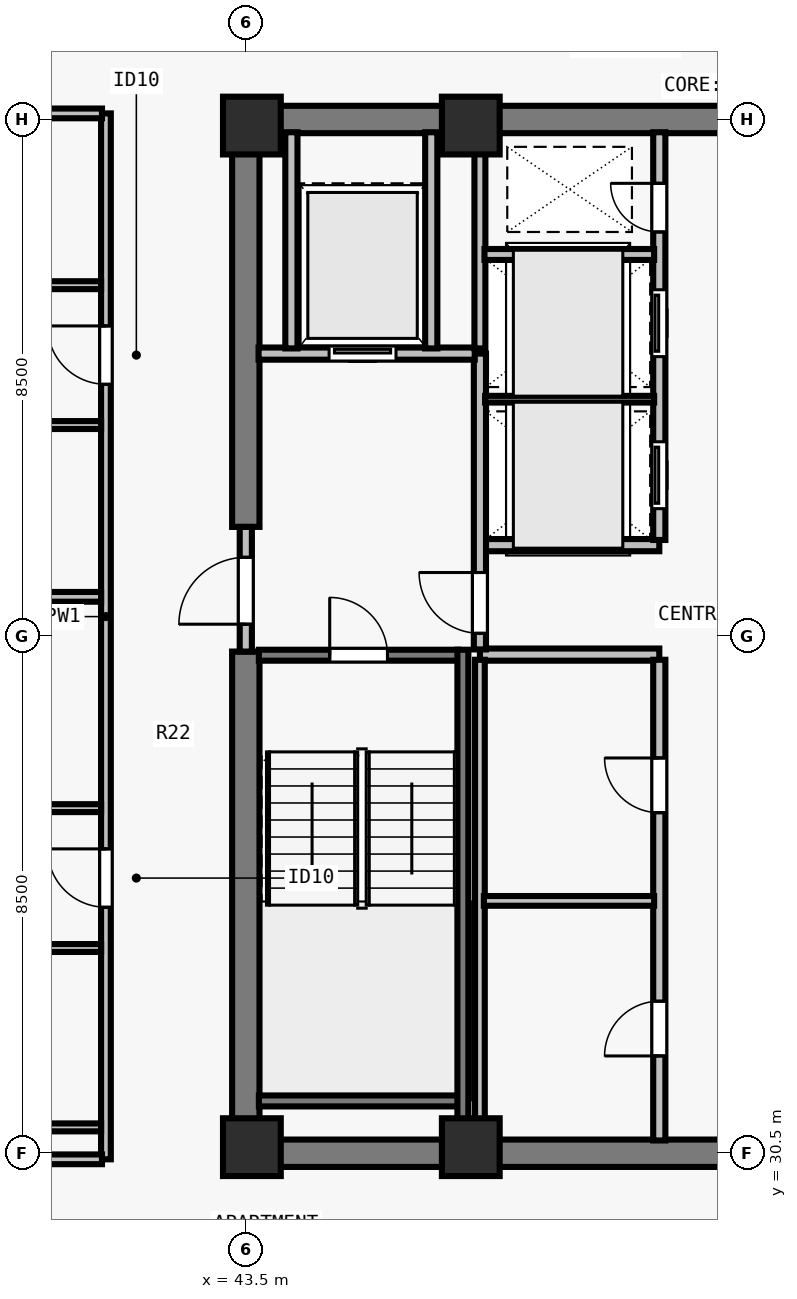
"""IFC4 building model, lengths in metres.
Left out: names, types, materials, properties, quantities, classifications, styles, units other than length and angle.
Written with IfcOpenShell. Run it as: python <this file> out.ifc"""

import sys

from ifc_helpers import new_model, si_unit, direction, frame, frame_2d, origin, origin_2d, place, context, subcontext, project, spatial, rectangle, extrude, element, fill, save


model = new_model("IFC4")
c1 = context("Model", 3, precision=1e-05, world=origin(), true_north=direction((0.0, 1.0)))
c2 = subcontext(c1, "Body", "Model", "MODEL_VIEW")
j1 = project(units=[si_unit("LENGTHUNIT", "METRE"), si_unit("PLANEANGLEUNIT", "RADIAN")], contexts=[c1])
p1 = place(None, origin())
s1 = spatial("IfcSite", under=j1, at=p1, CompositionType="ELEMENT")
p2 = place(p1, origin())
s2 = spatial("IfcBuilding", under=s1, at=p2, CompositionType="ELEMENT")
p3 = place(p2, frame((0.0, 0.0, 234.0)))
s3 = spatial("IfcBuildingStorey", under=s2, at=p3, CompositionType="ELEMENT", Elevation=234.0)
for number, where, z_axis, x_axis in (
    (1, (43.6, 30.6, 0.0), (0.0, 0.0, 1.0), (1.0, 0.0, 0.0)),
    (2, (47.2, 30.6, 0.0), (0.0, 0.0, 1.0), (1.0, 0.0, 0.0)),
    (3, (43.6, 47.4, 0.0), (0.0, 0.0, 1.0), (1.0, 0.0, 0.0)),
    (4, (47.2, 47.4, 0.0), (0.0, 0.0, 1.0), (1.0, 0.0, 0.0)),
):
    element("IfcColumn", number, at=place(p3, frame(where, z_axis=z_axis, x_axis=x_axis)), inside=s3, PredefinedType="COLUMN", context=c2, shape_type="SweptSolid", body=[
        extrude(rectangle(XDim=0.95, YDim=0.95, at=origin_2d()), origin(), (0.0, 0.0, 1.0), 3.5),
    ])
for number, where, z_axis, x_axis in (
    (5, (43.275, 30.5, 0.0), (0.0, 0.0, 1.0), (1.0, 0.0, 0.0)),
    (6, (43.275, 47.5, 0.0), (0.0, 0.0, 1.0), (1.0, 0.0, 0.0)),
):
    element("IfcWall", number, at=place(p3, frame(where, z_axis=z_axis, x_axis=x_axis)), inside=s3, PredefinedType="SHEAR", context=c2, shape_type="SweptSolid", body=[
        extrude(rectangle(XDim=17.45, YDim=0.45, at=frame_2d((8.725, 0.0))), origin(), (0.0, 0.0, 1.0), 3.29),
    ])
p4 = place(p3, frame((43.5, 30.715, 0.0), z_axis=(0.0, 0.0, 1.0), x_axis=(0.0, 1.0, 0.0)))
e7 = element("IfcWall", 7, at=p4, inside=s3, PredefinedType="SHEAR", context=c2, shape_type="SweptSolid", body=[
    extrude(rectangle(XDim=8.035, YDim=0.45, at=frame_2d((4.018, 0.0))), origin(), (0.0, 0.0, 1.0), 3.29),
])
p5 = place(p3, frame((43.5, 40.8, 0.0), z_axis=(0.0, 0.0, 1.0), x_axis=(0.0, 1.0, 0.0)))
e8 = element("IfcWall", 8, at=p5, inside=s3, PredefinedType="SHEAR", context=c2, shape_type="SweptSolid", body=[
    extrude(rectangle(XDim=6.485, YDim=0.45, at=frame_2d((3.242, 0.0))), origin(), (0.0, 0.0, 1.0), 3.29),
])
for number, where, z_axis, x_axis in (
    (9, (47.35, 38.7, 0.0), (0.0, 0.0, 1.0), (1.0, 0.0, 0.0)),
    (10, (47.35, 40.5, 0.0), (0.0, 0.0, 1.0), (1.0, 0.0, 0.0)),
):
    element("IfcWall", number, at=place(p3, frame(where, z_axis=z_axis, x_axis=x_axis)), inside=s3, PredefinedType="SOLIDWALL", context=c2, shape_type="SweptSolid", body=[
        extrude(rectangle(XDim=2.95, YDim=0.2, at=frame_2d((1.475, 0.0))), origin(), (0.0, 0.0, 1.0), 3.29),
    ])
p6 = place(p3, frame((50.3, 30.71, 0.0), z_axis=(0.0, 0.0, 1.0), x_axis=(0.0, 1.0, 0.0)))
e11 = element("IfcWall", 11, at=p6, inside=s3, PredefinedType="SOLIDWALL", context=c2, shape_type="SweptSolid", body=[
    extrude(rectangle(XDim=7.905, YDim=0.2, at=frame_2d((3.953, 0.0))), origin(), (0.0, 0.0, 1.0), 3.29),
])
p7 = place(p6, frame((1.39, 0.0, 0.0)))
e12 = element("IfcOpeningElement", 12, at=p7, cuts=e11, PredefinedType="OPENING", context=c2, shape_type="SweptSolid", body=[
    extrude(rectangle(XDim=0.9, YDim=2.12, at=frame_2d((0.45, 1.06))), frame((0.0, 0.11, 0.0), z_axis=(0.0, -1.0, 0.0), x_axis=(1.0, 0.0, 0.0)), (0.0, 0.0, 1.0), 0.22),
])
p8 = place(p6, frame((5.39, 0.0, 0.0)))
e13 = element("IfcOpeningElement", 13, at=p8, cuts=e11, PredefinedType="OPENING", context=c2, shape_type="SweptSolid", body=[
    extrude(rectangle(XDim=0.9, YDim=2.12, at=frame_2d((0.45, 1.06))), frame((0.0, 0.11, 0.0), z_axis=(0.0, -1.0, 0.0), x_axis=(1.0, 0.0, 0.0)), (0.0, 0.0, 1.0), 0.22),
])
p9 = place(p3, frame((50.3, 40.585, 0.0), z_axis=(0.0, 0.0, 1.0), x_axis=(0.0, 1.0, 0.0)))
e14 = element("IfcWall", 14, at=p9, inside=s3, PredefinedType="SOLIDWALL", context=c2, shape_type="SweptSolid", body=[
    extrude(rectangle(XDim=6.705, YDim=0.2, at=frame_2d((3.353, 0.0))), origin(), (0.0, 0.0, 1.0), 3.29),
])
p10 = place(p9, frame((0.515, 0.0, 0.0)))
e15 = element("IfcOpeningElement", 15, at=p10, cuts=e14, PredefinedType="OPENING", context=c2, shape_type="SweptSolid", body=[
    extrude(rectangle(XDim=1.1, YDim=2.2, at=frame_2d((0.55, 1.1))), frame((0.0, 0.11, 0.0), z_axis=(0.0, -1.0, 0.0), x_axis=(1.0, 0.0, 0.0)), (0.0, 0.0, 1.0), 0.22),
])
p11 = place(p9, frame((3.015, 0.0, 0.0)))
e16 = element("IfcOpeningElement", 16, at=p11, cuts=e14, PredefinedType="OPENING", context=c2, shape_type="SweptSolid", body=[
    extrude(rectangle(XDim=1.1, YDim=2.2, at=frame_2d((0.55, 1.1))), frame((0.0, 0.11, 0.0), z_axis=(0.0, -1.0, 0.0), x_axis=(1.0, 0.0, 0.0)), (0.0, 0.0, 1.0), 0.22),
])
p12 = place(p9, frame((5.065, 0.0, 0.0)))
e17 = element("IfcOpeningElement", 17, at=p12, cuts=e14, PredefinedType="OPENING", context=c2, shape_type="SweptSolid", body=[
    extrude(rectangle(XDim=0.8, YDim=2.08, at=frame_2d((0.4, 1.04))), frame((0.0, 0.11, 0.0), z_axis=(0.0, -1.0, 0.0), x_axis=(1.0, 0.0, 0.0)), (0.0, 0.0, 1.0), 0.22),
])
p13 = place(p3, frame((43.5, 38.75, 0.0), z_axis=(0.0, 0.0, 1.0), x_axis=(0.0, 1.0, 0.0)))
e18 = element("IfcWall", 18, at=p13, inside=s3, PredefinedType="SOLIDWALL", context=c2, shape_type="SweptSolid", body=[
    extrude(rectangle(XDim=2.05, YDim=0.2, at=frame_2d((1.025, 0.0))), origin(), (0.0, 0.0, 1.0), 3.29),
])
p14 = place(p13, frame((0.45, 0.0, 0.0)))
e19 = element("IfcOpeningElement", 19, at=p14, cuts=e18, PredefinedType="OPENING", context=c2, shape_type="SweptSolid", body=[
    extrude(rectangle(XDim=1.1, YDim=2.15, at=frame_2d((0.55, 1.075))), frame((0.0, 0.11, 0.0), z_axis=(0.0, -1.0, 0.0), x_axis=(1.0, 0.0, 0.0)), (0.0, 0.0, 1.0), 0.22),
])
p15 = place(p3, frame((47.35, 38.785, 0.0), z_axis=(0.0, 0.0, 1.0), x_axis=(0.0, 1.0, 0.0)))
e20 = element("IfcWall", 20, at=p15, inside=s3, PredefinedType="SOLIDWALL", context=c2, shape_type="SweptSolid", body=[
    extrude(rectangle(XDim=4.865, YDim=0.2, at=frame_2d((2.433, 0.0))), origin(), (0.0, 0.0, 1.0), 3.29),
])
p16 = place(p15, frame((0.265, 0.0, 0.0)))
e21 = element("IfcOpeningElement", 21, at=p16, cuts=e20, PredefinedType="OPENING", context=c2, shape_type="SweptSolid", body=[
    extrude(rectangle(XDim=1.0, YDim=2.15, at=frame_2d((0.5, 1.075))), frame((0.0, 0.11, 0.0), z_axis=(0.0, -1.0, 0.0), x_axis=(1.0, 0.0, 0.0)), (0.0, 0.0, 1.0), 0.22),
])
p17 = place(p3, frame((43.71, 43.65, 0.0), z_axis=(0.0, 0.0, 1.0), x_axis=(1.0, 0.0, 0.0)))
e22 = element("IfcWall", 22, at=p17, inside=s3, PredefinedType="SOLIDWALL", context=c2, shape_type="SweptSolid", body=[
    extrude(rectangle(XDim=3.555, YDim=0.2, at=frame_2d((1.777, 0.0))), origin(), (0.0, 0.0, 1.0), 3.29),
])
p18 = place(p17, frame((1.16, 0.0, 0.0)))
e23 = element("IfcOpeningElement", 23, at=p18, cuts=e22, PredefinedType="OPENING", context=c2, shape_type="SweptSolid", body=[
    extrude(rectangle(XDim=1.1, YDim=2.2, at=frame_2d((0.55, 1.1))), frame((0.0, 0.11, 0.0), z_axis=(0.0, -1.0, 0.0), x_axis=(1.0, 0.0, 0.0)), (0.0, 0.0, 1.0), 0.22),
])
for number, where, z_axis, x_axis in (
    (24, (46.55, 43.735, 0.0), (0.0, 0.0, 1.0), (0.0, 1.0, 0.0)),
    (25, (44.25, 43.735, 0.0), (0.0, 0.0, 1.0), (0.0, 1.0, 0.0)),
):
    element("IfcWall", number, at=place(p3, frame(where, z_axis=z_axis, x_axis=x_axis)), inside=s3, PredefinedType="SOLIDWALL", context=c2, shape_type="SweptSolid", body=[
        extrude(rectangle(XDim=3.555, YDim=0.2, at=frame_2d((1.777, 0.0))), origin(), (0.0, 0.0, 1.0), 3.29),
    ])
p19 = place(p3, frame((47.35, 30.71, 0.0), z_axis=(0.0, 0.0, 1.0), x_axis=(0.0, 1.0, 0.0)))
e26 = element("IfcWall", 26, at=p19, inside=s3, PredefinedType="PARTITIONING", context=c2, shape_type="SweptSolid", body=[
    extrude(rectangle(XDim=7.905, YDim=0.16, at=frame_2d((3.953, 0.0))), origin(), (0.0, 0.0, 1.0), 3.29),
])
p20 = place(p3, frame((47.415, 34.65, 0.0), z_axis=(0.0, 0.0, 1.0), x_axis=(1.0, 0.0, 0.0)))
e27 = element("IfcWall", 27, at=p20, inside=s3, PredefinedType="PARTITIONING", context=c2, shape_type="SweptSolid", body=[
    extrude(rectangle(XDim=2.8, YDim=0.16, at=frame_2d((1.4, 0.0))), origin(), (0.0, 0.0, 1.0), 3.29),
])
p21 = place(p3, frame((47.35, 43.735, 0.0), z_axis=(0.0, 0.0, 1.0), x_axis=(0.0, 1.0, 0.0)))
e28 = element("IfcWall", 28, at=p21, inside=s3, PredefinedType="SOLIDWALL", context=c2, shape_type="SweptSolid", body=[
    extrude(rectangle(XDim=3.555, YDim=0.18, at=frame_2d((1.777, 0.0))), origin(), (0.0, 0.0, 1.0), 3.29),
])
p22 = place(p3, frame((47.435, 42.9, 0.0), z_axis=(0.0, 0.0, 1.0), x_axis=(1.0, 0.0, 0.0)))
e29 = element("IfcWall", 29, at=p22, inside=s3, PredefinedType="PARTITIONING", context=c2, shape_type="SweptSolid", body=[
    extrude(rectangle(XDim=2.78, YDim=0.11, at=frame_2d((1.39, 0.0))), origin(), (0.0, 0.0, 1.0), 3.29),
])
p23 = place(p3, frame((47.425, 45.28, 0.0), z_axis=(0.0, 0.0, 1.0), x_axis=(1.0, 0.0, 0.0)))
e30 = element("IfcWall", 30, at=p23, inside=s3, PredefinedType="SOLIDWALL", context=c2, shape_type="SweptSolid", body=[
    extrude(rectangle(XDim=2.79, YDim=0.18, at=frame_2d((1.395, 0.0))), origin(), (0.0, 0.0, 1.0), 3.29),
])
p24 = place(p3, frame((41.2, 30.4, 0.0), z_axis=(0.0, 0.0, 1.0), x_axis=(0.0, 1.0, 0.0)))
e31 = element("IfcWall", 31, at=p24, inside=s3, PredefinedType="PARTITIONING", context=c2, shape_type="SweptSolid", body=[
    extrude(rectangle(XDim=17.2, YDim=0.16, at=frame_2d((8.6, 0.0))), origin(), (0.0, 0.0, 1.0), 3.29),
])
p25 = place(p24, frame((4.145, 0.0, 0.0)))
e32 = element("IfcOpeningElement", 32, at=p25, cuts=e31, PredefinedType="OPENING", context=c2, shape_type="SweptSolid", body=[
    extrude(rectangle(XDim=0.96, YDim=2.18, at=frame_2d((0.48, 1.09))), frame((0.0, 0.09, 0.0), z_axis=(0.0, -1.0, 0.0), x_axis=(1.0, 0.0, 0.0)), (0.0, 0.0, 1.0), 0.18),
])
p26 = place(p24, frame((12.745, 0.0, 0.0)))
e33 = element("IfcOpeningElement", 33, at=p26, cuts=e31, PredefinedType="OPENING", context=c2, shape_type="SweptSolid", body=[
    extrude(rectangle(XDim=0.96, YDim=2.18, at=frame_2d((0.48, 1.09))), frame((0.0, 0.09, 0.0), z_axis=(0.0, -1.0, 0.0), x_axis=(1.0, 0.0, 0.0)), (0.0, 0.0, 1.0), 0.18),
])
p27 = place(p3, frame((29.805, 30.4, 0.0), z_axis=(0.0, 0.0, 1.0), x_axis=(1.0, 0.0, 0.0)))
e34 = element("IfcWall", 34, at=p27, inside=s3, PredefinedType="PARTITIONING", context=c2, shape_type="SweptSolid", body=[
    extrude(rectangle(XDim=11.33, YDim=0.16, at=frame_2d((5.665, 0.0))), origin(), (0.0, 0.0, 1.0), 3.29),
])
p28 = place(p3, frame((29.915, 47.6, 0.0), z_axis=(0.0, 0.0, 1.0), x_axis=(1.0, 0.0, 0.0)))
e35 = element("IfcWall", 35, at=p28, inside=s3, PredefinedType="PARTITIONING", context=c2, shape_type="SweptSolid", body=[
    extrude(rectangle(XDim=11.22, YDim=0.16, at=frame_2d((5.61, 0.0))), origin(), (0.0, 0.0, 1.0), 3.29),
])
p29 = place(p3, frame((29.805, 39.65, 0.0), z_axis=(0.0, 0.0, 1.0), x_axis=(1.0, 0.0, 0.0)))
e36 = element("IfcWall", 36, at=p29, inside=s3, PredefinedType="PARTITIONING", context=c2, shape_type="SweptSolid", body=[
    extrude(rectangle(XDim=11.315, YDim=0.16, at=frame_2d((5.658, 0.0))), origin(), (0.0, 0.0, 1.0), 2.958),
])
p30 = place(p3, frame((38.37, 30.925, 0.0), z_axis=(0.0, 0.0, 1.0), x_axis=(1.0, 0.0, 0.0)))
e37 = element("IfcWall", 37, at=p30, inside=s3, PredefinedType="PLUMBINGWALL", context=c2, shape_type="SweptSolid", body=[
    extrude(rectangle(XDim=2.75, YDim=0.13, at=frame_2d((1.375, 0.0))), origin(), (0.0, 0.0, 1.0), 3.29),
])
p31 = place(p3, frame((38.37, 33.875, 0.0), z_axis=(0.0, 0.0, 1.0), x_axis=(1.0, 0.0, 0.0)))
e38 = element("IfcWall", 38, at=p31, inside=s3, PredefinedType="PLUMBINGWALL", context=c2, shape_type="SweptSolid", body=[
    extrude(rectangle(XDim=2.75, YDim=0.13, at=frame_2d((1.375, 0.0))), origin(), (0.0, 0.0, 1.0), 3.29),
])
p32 = place(p31, frame((0.55, 0.0, 0.0)))
e39 = element("IfcOpeningElement", 39, at=p32, cuts=e38, PredefinedType="OPENING", context=c2, shape_type="SweptSolid", body=[
    extrude(rectangle(XDim=0.85, YDim=2.08, at=frame_2d((0.425, 1.04))), frame((0.0, 0.075, 0.0), z_axis=(0.0, -1.0, 0.0), x_axis=(1.0, 0.0, 0.0)), (0.0, 0.0, 1.0), 0.15),
])
p33 = place(p3, frame((38.37, 36.175, 0.0), z_axis=(0.0, 0.0, 1.0), x_axis=(1.0, 0.0, 0.0)))
e40 = element("IfcWall", 40, at=p33, inside=s3, PredefinedType="PLUMBINGWALL", context=c2, shape_type="SweptSolid", body=[
    extrude(rectangle(XDim=2.75, YDim=0.13, at=frame_2d((1.375, 0.0))), origin(), (0.0, 0.0, 1.0), 3.29),
])
p34 = place(p33, frame((0.55, 0.0, 0.0)))
e41 = element("IfcOpeningElement", 41, at=p34, cuts=e40, PredefinedType="OPENING", context=c2, shape_type="SweptSolid", body=[
    extrude(rectangle(XDim=0.88, YDim=2.1, at=frame_2d((0.44, 1.05))), frame((0.0, 0.075, 0.0), z_axis=(0.0, -1.0, 0.0), x_axis=(1.0, 0.0, 0.0)), (0.0, 0.0, 1.0), 0.15),
])
p35 = place(p3, frame((38.37, 42.475, 0.0), z_axis=(0.0, 0.0, 1.0), x_axis=(1.0, 0.0, 0.0)))
e42 = element("IfcWall", 42, at=p35, inside=s3, PredefinedType="PLUMBINGWALL", context=c2, shape_type="SweptSolid", body=[
    extrude(rectangle(XDim=2.75, YDim=0.13, at=frame_2d((1.375, 0.0))), origin(), (0.0, 0.0, 1.0), 2.958),
])
p36 = place(p35, frame((0.55, 0.0, 0.0)))
e43 = element("IfcOpeningElement", 43, at=p36, cuts=e42, PredefinedType="OPENING", context=c2, shape_type="SweptSolid", body=[
    extrude(rectangle(XDim=0.85, YDim=2.08, at=frame_2d((0.425, 1.04))), frame((0.0, 0.075, 0.0), z_axis=(0.0, -1.0, 0.0), x_axis=(1.0, 0.0, 0.0)), (0.0, 0.0, 1.0), 0.15),
])
p37 = place(p3, frame((38.37, 44.775, 0.0), z_axis=(0.0, 0.0, 1.0), x_axis=(1.0, 0.0, 0.0)))
e44 = element("IfcWall", 44, at=p37, inside=s3, PredefinedType="PLUMBINGWALL", context=c2, shape_type="SweptSolid", body=[
    extrude(rectangle(XDim=2.75, YDim=0.13, at=frame_2d((1.375, 0.0))), origin(), (0.0, 0.0, 1.0), 2.958),
])
p38 = place(p37, frame((0.55, 0.0, 0.0)))
e45 = element("IfcOpeningElement", 45, at=p38, cuts=e44, PredefinedType="OPENING", context=c2, shape_type="SweptSolid", body=[
    extrude(rectangle(XDim=0.88, YDim=2.1, at=frame_2d((0.44, 1.05))), frame((0.0, 0.075, 0.0), z_axis=(0.0, -1.0, 0.0), x_axis=(1.0, 0.0, 0.0)), (0.0, 0.0, 1.0), 0.15),
])
p39 = place(p3, frame((43.715, 38.69, 0.0), z_axis=(0.0, 0.0, 1.0), x_axis=(1.0, 0.0, 0.0)))
e46 = element("IfcWall", 46, at=p39, inside=s3, PredefinedType="SOLIDWALL", context=c2, shape_type="SweptSolid", body=[
    extrude(rectangle(XDim=3.28, YDim=0.18, at=frame_2d((1.64, 0.0))), origin(), (0.0, 0.0, 1.0), 3.29),
])
p40 = place(p39, frame((1.165, 0.0, 0.0)))
e47 = element("IfcOpeningElement", 47, at=p40, cuts=e46, PredefinedType="OPENING", context=c2, shape_type="SweptSolid", body=[
    extrude(rectangle(XDim=0.95, YDim=2.15, at=frame_2d((0.475, 1.075))), frame((0.0, 0.1, 0.0), z_axis=(0.0, -1.0, 0.0), x_axis=(1.0, 0.0, 0.0)), (0.0, 0.0, 1.0), 0.2),
])
p41 = place(p3, frame((43.715, 31.36, 0.0), z_axis=(0.0, 0.0, 1.0), x_axis=(1.0, 0.0, 0.0)))
e48 = element("IfcWall", 48, at=p41, inside=s3, PredefinedType="SOLIDWALL", context=c2, shape_type="SweptSolid", body=[
    extrude(rectangle(XDim=3.28, YDim=0.18, at=frame_2d((1.64, 0.0))), origin(), (0.0, 0.0, 1.0), 3.29),
])
p42 = place(p3, frame((47.07, 38.78, 0.0), z_axis=(0.0, 0.0, 1.0), x_axis=(0.0, -1.0, 0.0)))
e49 = element("IfcWall", 49, at=p42, inside=s3, PredefinedType="SOLIDWALL", context=c2, shape_type="SweptSolid", body=[
    extrude(rectangle(XDim=8.067, YDim=0.18, at=frame_2d((4.034, 0.0))), origin(), (0.0, 0.0, 1.0), 3.29),
])
p43 = place(p14, origin())
e50 = element("IfcDoor", 50, at=p43, inside=s3, OperationType="SINGLE_SWING_LEFT", PredefinedType="DOOR", context=c2, shape_type="SweptSolid", body=[
    extrude(rectangle(XDim=1.1, YDim=2.15, at=frame_2d((0.55, 1.075))), frame((0.0, 0.025, 0.0), z_axis=(0.0, -1.0, 0.0), x_axis=(1.0, 0.0, 0.0)), (0.0, 0.0, 1.0), 0.05),
])
fill(e19, e50)
p44 = place(p16, origin())
e51 = element("IfcDoor", 51, at=p44, inside=s3, OperationType="SINGLE_SWING_RIGHT", PredefinedType="DOOR", context=c2, shape_type="SweptSolid", body=[
    extrude(rectangle(XDim=1.0, YDim=2.15, at=frame_2d((0.5, 1.075))), frame((0.0, 0.025, 0.0), z_axis=(0.0, -1.0, 0.0), x_axis=(1.0, 0.0, 0.0)), (0.0, 0.0, 1.0), 0.05),
])
fill(e21, e51)
p45 = place(p18, origin())
e52 = element("IfcDoor", 52, at=p45, inside=s3, OperationType="SLIDING_TO_LEFT", PredefinedType="DOOR", context=c2, shape_type="SweptSolid", body=[
    extrude(rectangle(XDim=1.1, YDim=2.2, at=frame_2d((0.55, 1.1))), frame((0.0, 0.025, 0.0), z_axis=(0.0, -1.0, 0.0), x_axis=(1.0, 0.0, 0.0)), (0.0, 0.0, 1.0), 0.05),
])
fill(e23, e52)
p46 = place(p7, origin())
e53 = element("IfcDoor", 53, at=p46, inside=s3, OperationType="SINGLE_SWING_LEFT", PredefinedType="DOOR", context=c2, shape_type="SweptSolid", body=[
    extrude(rectangle(XDim=0.9, YDim=2.12, at=frame_2d((0.45, 1.06))), frame((0.0, 0.025, 0.0), z_axis=(0.0, -1.0, 0.0), x_axis=(1.0, 0.0, 0.0)), (0.0, 0.0, 1.0), 0.05),
])
fill(e12, e53)
p47 = place(p8, origin())
e54 = element("IfcDoor", 54, at=p47, inside=s3, OperationType="SINGLE_SWING_RIGHT", PredefinedType="DOOR", context=c2, shape_type="SweptSolid", body=[
    extrude(rectangle(XDim=0.9, YDim=2.12, at=frame_2d((0.45, 1.06))), frame((0.0, 0.025, 0.0), z_axis=(0.0, -1.0, 0.0), x_axis=(1.0, 0.0, 0.0)), (0.0, 0.0, 1.0), 0.05),
])
fill(e13, e54)
p48 = place(p10, origin())
e55 = element("IfcDoor", 55, at=p48, inside=s3, OperationType="SLIDING_TO_LEFT", PredefinedType="DOOR", context=c2, shape_type="SweptSolid", body=[
    extrude(rectangle(XDim=1.1, YDim=2.2, at=frame_2d((0.55, 1.1))), frame((0.0, 0.025, 0.0), z_axis=(0.0, -1.0, 0.0), x_axis=(1.0, 0.0, 0.0)), (0.0, 0.0, 1.0), 0.05),
])
fill(e15, e55)
p49 = place(p11, origin())
e56 = element("IfcDoor", 56, at=p49, inside=s3, OperationType="SLIDING_TO_LEFT", PredefinedType="DOOR", context=c2, shape_type="SweptSolid", body=[
    extrude(rectangle(XDim=1.1, YDim=2.2, at=frame_2d((0.55, 1.1))), frame((0.0, 0.025, 0.0), z_axis=(0.0, -1.0, 0.0), x_axis=(1.0, 0.0, 0.0)), (0.0, 0.0, 1.0), 0.05),
])
fill(e16, e56)
p50 = place(p12, origin())
e57 = element("IfcDoor", 57, at=p50, inside=s3, OperationType="SINGLE_SWING_RIGHT", PredefinedType="DOOR", context=c2, shape_type="SweptSolid", body=[
    extrude(rectangle(XDim=0.8, YDim=2.08, at=frame_2d((0.4, 1.04))), frame((0.0, 0.025, 0.0), z_axis=(0.0, -1.0, 0.0), x_axis=(1.0, 0.0, 0.0)), (0.0, 0.0, 1.0), 0.05),
])
fill(e17, e57)
p51 = place(p25, origin())
e58 = element("IfcDoor", 58, at=p51, inside=s3, OperationType="SINGLE_SWING_RIGHT", PredefinedType="DOOR", context=c2, shape_type="SweptSolid", body=[
    extrude(rectangle(XDim=0.96, YDim=2.18, at=frame_2d((0.48, 1.09))), frame((0.0, 0.025, 0.0), z_axis=(0.0, -1.0, 0.0), x_axis=(1.0, 0.0, 0.0)), (0.0, 0.0, 1.0), 0.05),
])
fill(e32, e58)
p52 = place(p26, origin())
e59 = element("IfcDoor", 59, at=p52, inside=s3, OperationType="SINGLE_SWING_RIGHT", PredefinedType="DOOR", context=c2, shape_type="SweptSolid", body=[
    extrude(rectangle(XDim=0.96, YDim=2.18, at=frame_2d((0.48, 1.09))), frame((0.0, 0.025, 0.0), z_axis=(0.0, -1.0, 0.0), x_axis=(1.0, 0.0, 0.0)), (0.0, 0.0, 1.0), 0.05),
])
fill(e33, e59)
p53 = place(p40, origin())
e60 = element("IfcDoor", 60, at=p53, inside=s3, OperationType="SINGLE_SWING_LEFT", PredefinedType="DOOR", context=c2, shape_type="SweptSolid", body=[
    extrude(rectangle(XDim=0.95, YDim=2.15, at=frame_2d((0.475, 1.075))), frame((0.0, 0.025, 0.0), z_axis=(0.0, -1.0, 0.0), x_axis=(1.0, 0.0, 0.0)), (0.0, 0.0, 1.0), 0.05),
])
fill(e47, e60)
save(model, sys.argv[1])
